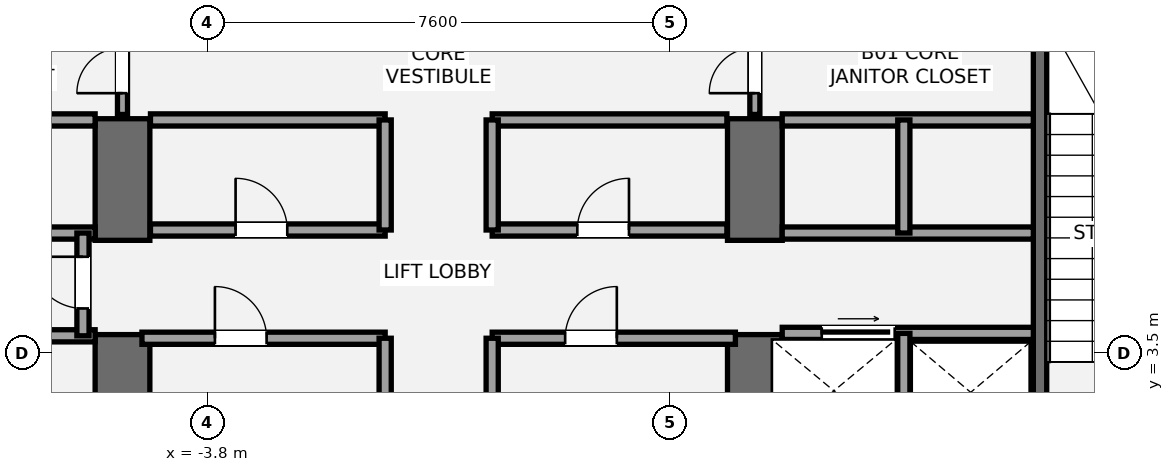
"""IFC4 building model, lengths in metres.
Left out: names, types, materials, properties, quantities, classifications, styles, units other than length and angle.
Written with IfcOpenShell. Run it as: python <this file> out.ifc"""

import sys

from ifc_helpers import new_model, si_unit, direction, frame, frame_2d, origin, place, context, subcontext, project, spatial, rectangle, extrude, element, fill, save


model = new_model("IFC4")
c1 = context("Model", 3, precision=1e-05, world=origin(), true_north=direction((0.0, 1.0)))
c2 = subcontext(c1, "Body", "Model", "MODEL_VIEW")
j1 = project(units=[si_unit("LENGTHUNIT", "METRE"), si_unit("PLANEANGLEUNIT", "RADIAN")], contexts=[c1])
p1 = place(None, origin())
s1 = spatial("IfcSite", under=j1, at=p1, CompositionType="ELEMENT")
p2 = place(p1, origin())
s2 = spatial("IfcBuilding", under=s1, at=p2, CompositionType="ELEMENT")
p3 = place(p2, frame((0.0, 0.0, -4.4)))
s3 = spatial("IfcBuildingStorey", under=s2, at=p3, CompositionType="ELEMENT", Elevation=-4.4)
p4 = place(p3, frame((-5.2, 0.95, 0.0), z_axis=(0.0, 0.0, 1.0), x_axis=(0.0, 1.0, 0.0)))
e1 = element("IfcWall", 1, at=p4, inside=s3, PredefinedType="SHEAR", context=c2, shape_type="SweptSolid", body=[
    extrude(rectangle(XDim=2.85, YDim=0.9, at=frame_2d((1.425, 0.0))), origin(), (0.0, 0.0, 1.0), 4.4),
])
p5 = place(p3, frame((-5.2, 5.35, 0.0), z_axis=(0.0, 0.0, 1.0), x_axis=(0.0, 1.0, 0.0)))
e2 = element("IfcWall", 2, at=p5, inside=s3, PredefinedType="SHEAR", context=c2, shape_type="SweptSolid", body=[
    extrude(rectangle(XDim=2.0, YDim=0.9, at=frame_2d((1.0, 0.0))), origin(), (0.0, 0.0, 1.0), 4.4),
])
p6 = place(p3, frame((5.2, 0.95, 0.0), z_axis=(0.0, 0.0, 1.0), x_axis=(0.0, 1.0, 0.0)))
e3 = element("IfcWall", 3, at=p6, inside=s3, PredefinedType="SHEAR", context=c2, shape_type="SweptSolid", body=[
    extrude(rectangle(XDim=2.85, YDim=0.9, at=frame_2d((1.425, 0.0))), origin(), (0.0, 0.0, 1.0), 4.4),
])
p7 = place(p3, frame((5.2, 5.35, 0.0), z_axis=(0.0, 0.0, 1.0), x_axis=(0.0, 1.0, 0.0)))
e4 = element("IfcWall", 4, at=p7, inside=s3, PredefinedType="SHEAR", context=c2, shape_type="SweptSolid", body=[
    extrude(rectangle(XDim=2.0, YDim=0.9, at=frame_2d((1.0, 0.0))), origin(), (0.0, 0.0, 1.0), 4.4),
])
p8 = place(p3, frame((9.89, 1.85, 0.0), z_axis=(0.0, 0.0, 1.0), x_axis=(0.0, 1.0, 0.0)))
e5 = element("IfcWall", 5, at=p8, inside=s3, PredefinedType="SHEAR", context=c2, shape_type="SweptSolid", body=[
    extrude(rectangle(XDim=7.15, YDim=0.22, at=frame_2d((3.575, 0.0))), origin(), (0.0, 0.0, 1.0), 4.4),
])
for number, where, z_axis, x_axis in (
    (6, (-9.78, 3.78, 0.0), (0.0, 0.0, 1.0), (1.0, 0.0, 0.0)),
    (7, (-9.78, 5.47, 0.0), (0.0, 0.0, 1.0), (1.0, 0.0, 0.0)),
    (8, (-9.78, 7.33, 0.0), (0.0, 0.0, 1.0), (1.0, 0.0, 0.0)),
):
    element("IfcWall", number, at=place(p3, frame(where, z_axis=z_axis, x_axis=x_axis)), inside=s3, PredefinedType="SOLIDWALL", context=c2, shape_type="SweptSolid", body=[
        extrude(rectangle(XDim=4.13, YDim=0.2, at=frame_2d((2.065, 0.0))), origin(), (0.0, 0.0, 1.0), 4.14),
    ])
p9 = place(p3, frame((-5.85, 3.78, 0.0), z_axis=(0.0, 0.0, 1.0), x_axis=(0.0, 1.0, 0.0)))
e9 = element("IfcWall", 9, at=p9, inside=s3, PredefinedType="SOLIDWALL", context=c2, shape_type="SweptSolid", body=[
    extrude(rectangle(XDim=1.69, YDim=0.2, at=frame_2d((0.845, 0.0))), origin(), (0.0, 0.0, 1.0), 4.14),
])
p10 = place(p9, frame((0.45, 0.0, 0.0)))
e10 = element("IfcOpeningElement", 10, at=p10, cuts=e9, PredefinedType="OPENING", context=c2, shape_type="SweptSolid", body=[
    extrude(rectangle(XDim=0.85, YDim=2.1, at=frame_2d((0.425, 1.05))), frame((0.0, 0.11, 0.0), z_axis=(0.0, -1.0, 0.0), x_axis=(1.0, 0.0, 0.0)), (0.0, 0.0, 1.0), 0.22),
])
p11 = place(p3, frame((5.65, 3.82, 0.0), z_axis=(0.0, 0.0, 1.0), x_axis=(1.0, 0.0, 0.0)))
e11 = element("IfcWall", 11, at=p11, inside=s3, PredefinedType="SOLIDWALL", context=c2, shape_type="SweptSolid", body=[
    extrude(rectangle(XDim=4.13, YDim=0.2, at=frame_2d((2.065, 0.0))), origin(), (0.0, 0.0, 1.0), 4.14),
])
p12 = place(p11, frame((0.65, 0.0, 0.0)))
e12 = element("IfcOpeningElement", 12, at=p12, cuts=e11, PredefinedType="OPENING", context=c2, shape_type="SweptSolid", body=[
    extrude(rectangle(XDim=1.2, YDim=2.2, at=frame_2d((0.6, 1.1))), frame((0.0, 0.11, 0.0), z_axis=(0.0, -1.0, 0.0), x_axis=(1.0, 0.0, 0.0)), (0.0, 0.0, 1.0), 0.22),
])
p13 = place(p3, frame((7.65, 1.85, 0.0), z_axis=(0.0, 0.0, 1.0), x_axis=(0.0, 1.0, 0.0)))
e13 = element("IfcWall", 13, at=p13, inside=s3, PredefinedType="SOLIDWALL", context=c2, shape_type="SweptSolid", body=[
    extrude(rectangle(XDim=1.97, YDim=0.2, at=frame_2d((0.985, 0.0))), origin(), (0.0, 0.0, 1.0), 4.14),
])
for number, where, z_axis, x_axis in (
    (14, (5.65, 5.47, 0.0), (0.0, 0.0, 1.0), (1.0, 0.0, 0.0)),
    (15, (5.65, 7.33, 0.0), (0.0, 0.0, 1.0), (1.0, 0.0, 0.0)),
):
    element("IfcWall", number, at=place(p3, frame(where, z_axis=z_axis, x_axis=x_axis)), inside=s3, PredefinedType="SOLIDWALL", context=c2, shape_type="SweptSolid", body=[
        extrude(rectangle(XDim=4.13, YDim=0.2, at=frame_2d((2.065, 0.0))), origin(), (0.0, 0.0, 1.0), 4.14),
    ])
p14 = place(p3, frame((7.65, 5.47, 0.0), z_axis=(0.0, 0.0, 1.0), x_axis=(0.0, 1.0, 0.0)))
e16 = element("IfcWall", 16, at=p14, inside=s3, PredefinedType="SOLIDWALL", context=c2, shape_type="SweptSolid", body=[
    extrude(rectangle(XDim=1.86, YDim=0.2, at=frame_2d((0.93, 0.0))), origin(), (0.0, 0.0, 1.0), 4.14),
])
p15 = place(p3, frame((-4.88, 3.74, 0.0), z_axis=(0.0, 0.0, 1.0), x_axis=(1.0, 0.0, 0.0)))
e17 = element("IfcWall", 17, at=p15, inside=s3, PredefinedType="SOLIDWALL", context=c2, shape_type="SweptSolid", body=[
    extrude(rectangle(XDim=4.0, YDim=0.2, at=frame_2d((2.0, 0.0))), origin(), (0.0, 0.0, 1.0), 4.14),
])
p16 = place(p15, frame((1.2, 0.0, 0.0)))
e18 = element("IfcOpeningElement", 18, at=p16, cuts=e17, PredefinedType="OPENING", context=c2, shape_type="SweptSolid", body=[
    extrude(rectangle(XDim=0.85, YDim=2.1, at=frame_2d((0.425, 1.05))), frame((0.0, 0.11, 0.0), z_axis=(0.0, -1.0, 0.0), x_axis=(1.0, 0.0, 0.0)), (0.0, 0.0, 1.0), 0.22),
])
p17 = place(p3, frame((0.88, 3.74, 0.0), z_axis=(0.0, 0.0, 1.0), x_axis=(1.0, 0.0, 0.0)))
e19 = element("IfcWall", 19, at=p17, inside=s3, PredefinedType="SOLIDWALL", context=c2, shape_type="SweptSolid", body=[
    extrude(rectangle(XDim=4.0, YDim=0.2, at=frame_2d((2.0, 0.0))), origin(), (0.0, 0.0, 1.0), 4.14),
])
p18 = place(p17, frame((1.2, 0.0, 0.0)))
e20 = element("IfcOpeningElement", 20, at=p18, cuts=e19, PredefinedType="OPENING", context=c2, shape_type="SweptSolid", body=[
    extrude(rectangle(XDim=0.85, YDim=2.1, at=frame_2d((0.425, 1.05))), frame((0.0, 0.11, 0.0), z_axis=(0.0, -1.0, 0.0), x_axis=(1.0, 0.0, 0.0)), (0.0, 0.0, 1.0), 0.22),
])
for number, where, z_axis, x_axis in (
    (21, (-0.88, 1.85, 0.0), (0.0, 0.0, 1.0), (0.0, 1.0, 0.0)),
    (22, (0.88, 1.85, 0.0), (0.0, 0.0, 1.0), (0.0, 1.0, 0.0)),
):
    element("IfcWall", number, at=place(p3, frame(where, z_axis=z_axis, x_axis=x_axis)), inside=s3, PredefinedType="SOLIDWALL", context=c2, shape_type="SweptSolid", body=[
        extrude(rectangle(XDim=1.89, YDim=0.2, at=frame_2d((0.945, 0.0))), origin(), (0.0, 0.0, 1.0), 4.14),
    ])
p19 = place(p3, frame((-4.74, 5.52, 0.0), z_axis=(0.0, 0.0, 1.0), x_axis=(1.0, 0.0, 0.0)))
e23 = element("IfcWall", 23, at=p19, inside=s3, PredefinedType="SOLIDWALL", context=c2, shape_type="SweptSolid", body=[
    extrude(rectangle(XDim=3.86, YDim=0.2, at=frame_2d((1.93, 0.0))), origin(), (0.0, 0.0, 1.0), 4.14),
])
p20 = place(p19, frame((1.4, 0.0, 0.0)))
e24 = element("IfcOpeningElement", 24, at=p20, cuts=e23, PredefinedType="OPENING", context=c2, shape_type="SweptSolid", body=[
    extrude(rectangle(XDim=0.85, YDim=2.1, at=frame_2d((0.425, 1.05))), frame((0.0, 0.11, 0.0), z_axis=(0.0, -1.0, 0.0), x_axis=(1.0, 0.0, 0.0)), (0.0, 0.0, 1.0), 0.22),
])
p21 = place(p3, frame((0.88, 5.52, 0.0), z_axis=(0.0, 0.0, 1.0), x_axis=(1.0, 0.0, 0.0)))
e25 = element("IfcWall", 25, at=p21, inside=s3, PredefinedType="SOLIDWALL", context=c2, shape_type="SweptSolid", body=[
    extrude(rectangle(XDim=3.86, YDim=0.2, at=frame_2d((1.93, 0.0))), origin(), (0.0, 0.0, 1.0), 4.14),
])
p22 = place(p21, frame((1.4, 0.0, 0.0)))
e26 = element("IfcOpeningElement", 26, at=p22, cuts=e25, PredefinedType="OPENING", context=c2, shape_type="SweptSolid", body=[
    extrude(rectangle(XDim=0.85, YDim=2.1, at=frame_2d((0.425, 1.05))), frame((0.0, 0.11, 0.0), z_axis=(0.0, -1.0, 0.0), x_axis=(1.0, 0.0, 0.0)), (0.0, 0.0, 1.0), 0.22),
])
for number, where, z_axis, x_axis in (
    (27, (-4.74, 7.33, 0.0), (0.0, 0.0, 1.0), (1.0, 0.0, 0.0)),
    (28, (0.88, 7.33, 0.0), (0.0, 0.0, 1.0), (1.0, 0.0, 0.0)),
):
    element("IfcWall", number, at=place(p3, frame(where, z_axis=z_axis, x_axis=x_axis)), inside=s3, PredefinedType="SOLIDWALL", context=c2, shape_type="SweptSolid", body=[
        extrude(rectangle(XDim=3.86, YDim=0.2, at=frame_2d((1.93, 0.0))), origin(), (0.0, 0.0, 1.0), 4.14),
    ])
for number, where, z_axis, x_axis in (
    (29, (-0.88, 5.52, 0.0), (0.0, 0.0, 1.0), (0.0, 1.0, 0.0)),
    (30, (0.88, 5.52, 0.0), (0.0, 0.0, 1.0), (0.0, 1.0, 0.0)),
):
    element("IfcWall", number, at=place(p3, frame(where, z_axis=z_axis, x_axis=x_axis)), inside=s3, PredefinedType="SOLIDWALL", context=c2, shape_type="SweptSolid", body=[
        extrude(rectangle(XDim=1.81, YDim=0.2, at=frame_2d((0.905, 0.0))), origin(), (0.0, 0.0, 1.0), 4.14),
    ])
p23 = place(p3, frame((-5.2, 7.42, 0.0), z_axis=(0.0, 0.0, 1.0), x_axis=(0.0, 1.0, 0.0)))
e31 = element("IfcWall", 31, at=p23, inside=s3, PredefinedType="PARTITIONING", context=c2, shape_type="SweptSolid", body=[
    extrude(rectangle(XDim=1.58, YDim=0.165, at=frame_2d((0.79, 0.0))), origin(), (0.0, 0.0, 1.0), 4.14),
])
p24 = place(p23, frame((0.35, 0.0, 0.0)))
e32 = element("IfcOpeningElement", 32, at=p24, cuts=e31, PredefinedType="OPENING", context=c2, shape_type="SweptSolid", body=[
    extrude(rectangle(XDim=0.75, YDim=2.1, at=frame_2d((0.375, 1.05))), frame((0.0, 0.093, 0.0), z_axis=(0.0, -1.0, 0.0), x_axis=(1.0, 0.0, 0.0)), (0.0, 0.0, 1.0), 0.185),
])
p25 = place(p3, frame((5.2, 7.42, 0.0), z_axis=(0.0, 0.0, 1.0), x_axis=(0.0, 1.0, 0.0)))
e33 = element("IfcWall", 33, at=p25, inside=s3, PredefinedType="PARTITIONING", context=c2, shape_type="SweptSolid", body=[
    extrude(rectangle(XDim=1.58, YDim=0.165, at=frame_2d((0.79, 0.0))), origin(), (0.0, 0.0, 1.0), 4.14),
])
p26 = place(p25, frame((0.35, 0.0, 0.0)))
e34 = element("IfcOpeningElement", 34, at=p26, cuts=e33, PredefinedType="OPENING", context=c2, shape_type="SweptSolid", body=[
    extrude(rectangle(XDim=0.75, YDim=2.1, at=frame_2d((0.375, 1.05))), frame((0.0, 0.093, 0.0), z_axis=(0.0, -1.0, 0.0), x_axis=(1.0, 0.0, 0.0)), (0.0, 0.0, 1.0), 0.185),
])
p27 = place(p10, origin())
e35 = element("IfcDoor", 35, at=p27, inside=s3, OperationType="SINGLE_SWING_RIGHT", PredefinedType="DOOR", context=c2, shape_type="SweptSolid", body=[
    extrude(rectangle(XDim=0.85, YDim=2.1, at=frame_2d((0.425, 1.05))), frame((0.0, 0.025, 0.0), z_axis=(0.0, -1.0, 0.0), x_axis=(1.0, 0.0, 0.0)), (0.0, 0.0, 1.0), 0.05),
])
fill(e10, e35)
p28 = place(p12, origin())
e36 = element("IfcDoor", 36, at=p28, inside=s3, OperationType="SLIDING_TO_RIGHT", PredefinedType="DOOR", context=c2, shape_type="SweptSolid", body=[
    extrude(rectangle(XDim=1.2, YDim=2.2, at=frame_2d((0.6, 1.1))), frame((0.0, 0.025, 0.0), z_axis=(0.0, -1.0, 0.0), x_axis=(1.0, 0.0, 0.0)), (0.0, 0.0, 1.0), 0.05),
])
fill(e12, e36)
p29 = place(p16, origin())
e37 = element("IfcDoor", 37, at=p29, inside=s3, OperationType="SINGLE_SWING_LEFT", PredefinedType="DOOR", context=c2, shape_type="SweptSolid", body=[
    extrude(rectangle(XDim=0.85, YDim=2.1, at=frame_2d((0.425, 1.05))), frame((0.0, 0.025, 0.0), z_axis=(0.0, -1.0, 0.0), x_axis=(1.0, 0.0, 0.0)), (0.0, 0.0, 1.0), 0.05),
])
fill(e18, e37)
p30 = place(p18, origin())
e38 = element("IfcDoor", 38, at=p30, inside=s3, OperationType="SINGLE_SWING_RIGHT", PredefinedType="DOOR", context=c2, shape_type="SweptSolid", body=[
    extrude(rectangle(XDim=0.85, YDim=2.1, at=frame_2d((0.425, 1.05))), frame((0.0, 0.025, 0.0), z_axis=(0.0, -1.0, 0.0), x_axis=(1.0, 0.0, 0.0)), (0.0, 0.0, 1.0), 0.05),
])
fill(e20, e38)
p31 = place(p20, origin())
e39 = element("IfcDoor", 39, at=p31, inside=s3, OperationType="SINGLE_SWING_LEFT", PredefinedType="DOOR", context=c2, shape_type="SweptSolid", body=[
    extrude(rectangle(XDim=0.85, YDim=2.1, at=frame_2d((0.425, 1.05))), frame((0.0, 0.025, 0.0), z_axis=(0.0, -1.0, 0.0), x_axis=(1.0, 0.0, 0.0)), (0.0, 0.0, 1.0), 0.05),
])
fill(e24, e39)
p32 = place(p22, origin())
e40 = element("IfcDoor", 40, at=p32, inside=s3, OperationType="SINGLE_SWING_RIGHT", PredefinedType="DOOR", context=c2, shape_type="SweptSolid", body=[
    extrude(rectangle(XDim=0.85, YDim=2.1, at=frame_2d((0.425, 1.05))), frame((0.0, 0.025, 0.0), z_axis=(0.0, -1.0, 0.0), x_axis=(1.0, 0.0, 0.0)), (0.0, 0.0, 1.0), 0.05),
])
fill(e26, e40)
p33 = place(p24, origin())
e41 = element("IfcDoor", 41, at=p33, inside=s3, OperationType="SINGLE_SWING_LEFT", PredefinedType="DOOR", context=c2, shape_type="SweptSolid", body=[
    extrude(rectangle(XDim=0.75, YDim=2.1, at=frame_2d((0.375, 1.05))), frame((0.0, 0.025, 0.0), z_axis=(0.0, -1.0, 0.0), x_axis=(1.0, 0.0, 0.0)), (0.0, 0.0, 1.0), 0.05),
])
fill(e32, e41)
p34 = place(p26, origin())
e42 = element("IfcDoor", 42, at=p34, inside=s3, OperationType="SINGLE_SWING_LEFT", PredefinedType="DOOR", context=c2, shape_type="SweptSolid", body=[
    extrude(rectangle(XDim=0.75, YDim=2.1, at=frame_2d((0.375, 1.05))), frame((0.0, 0.025, 0.0), z_axis=(0.0, -1.0, 0.0), x_axis=(1.0, 0.0, 0.0)), (0.0, 0.0, 1.0), 0.05),
])
fill(e34, e42)
save(model, sys.argv[1])
